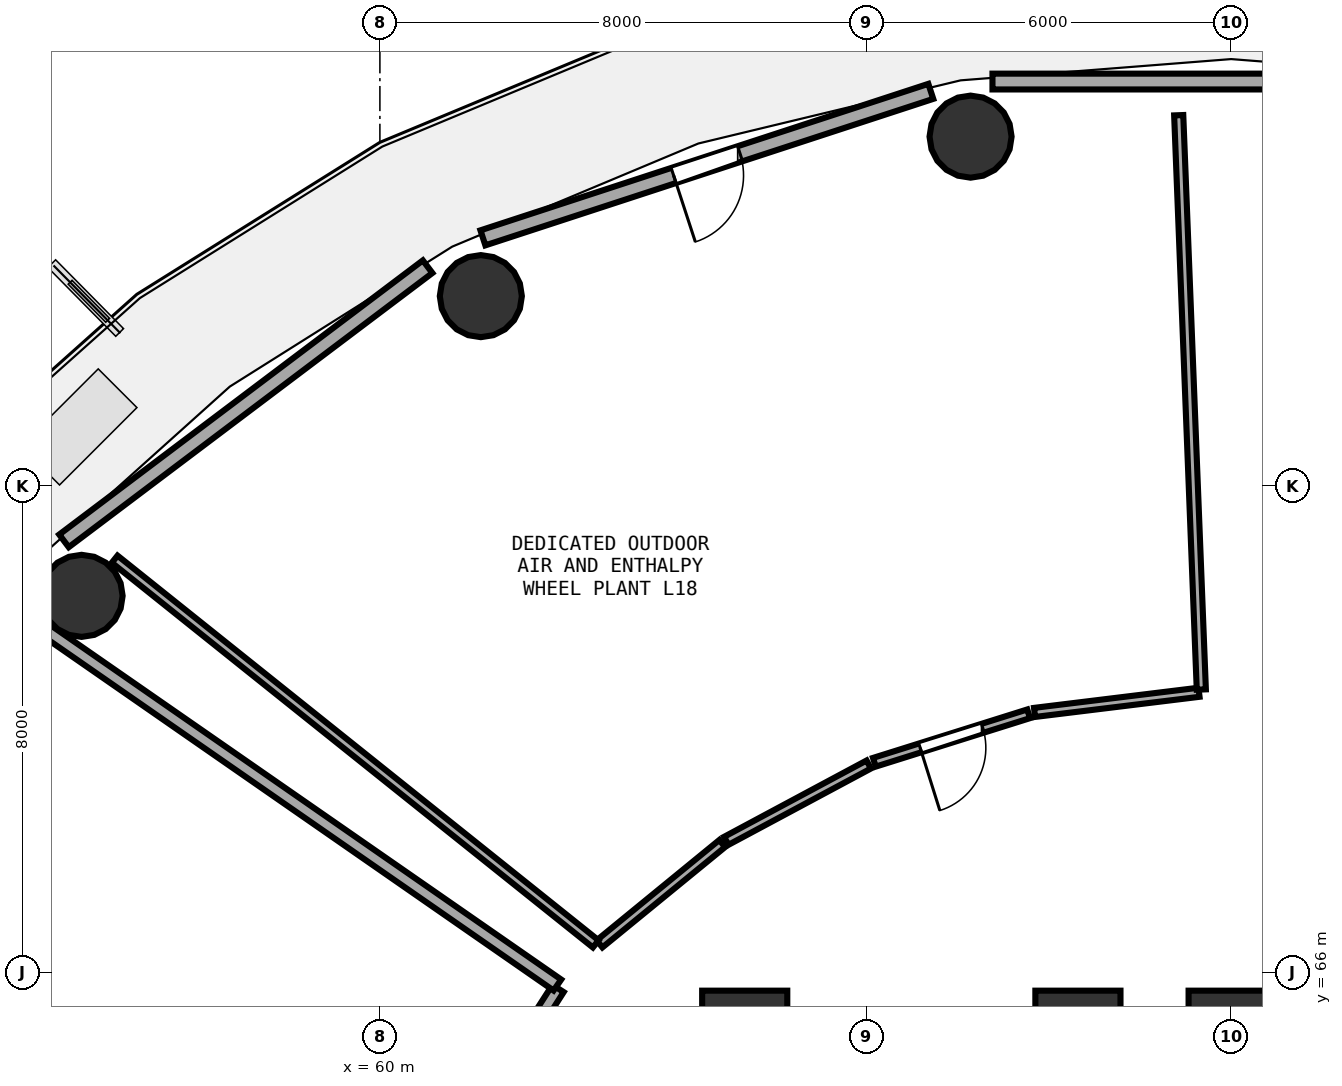
"""IFC4 building model, lengths in metres.
Left out: names, types, materials, properties, quantities, classifications, styles, units other than length and angle.
Written with IfcOpenShell. Run it as: python <this file> out.ifc"""

import sys

from ifc_helpers import new_model, si_unit, direction, frame, frame_2d, origin, origin_2d, place, context, subcontext, project, spatial, rectangle, circle, extrude, element, fill, save


model = new_model("IFC4")
c1 = context("Model", 3, precision=1e-05, world=origin(), true_north=direction((0.0, 1.0)))
c2 = subcontext(c1, "Body", "Model", "MODEL_VIEW")
j1 = project(units=[si_unit("LENGTHUNIT", "METRE"), si_unit("PLANEANGLEUNIT", "RADIAN")], contexts=[c1])
p1 = place(None, origin())
s1 = spatial("IfcSite", under=j1, at=p1, CompositionType="ELEMENT")
p2 = place(p1, origin())
s2 = spatial("IfcBuilding", under=s1, at=p2, CompositionType="ELEMENT")
p3 = place(p2, frame((0.0, 0.0, 72.26)))
s3 = spatial("IfcBuildingStorey", under=s2, at=p3, CompositionType="ELEMENT", Elevation=72.26)
for number, where, z_axis, x_axis in (
    (1, (74.0, 65.0, 0.0), (0.0, 0.0, 1.0), (1.0, 0.0, 0.0)),
    (2, (71.48, 65.0, 0.0), (0.0, 0.0, 1.0), (1.0, 0.0, 0.0)),
    (3, (66.0, 65.0, 0.0), (0.0, 0.0, 1.0), (1.0, 0.0, 0.0)),
):
    element("IfcColumn", number, at=place(p3, frame(where, z_axis=z_axis, x_axis=x_axis)), inside=s3, PredefinedType="PILASTER", context=c2, shape_type="SweptSolid", body=[
        extrude(rectangle(XDim=1.4, YDim=1.4, at=origin_2d()), origin(), (0.0, 0.0, 1.0), 4.09),
    ])
for number, where, z_axis, x_axis in (
    (4, (69.714, 79.745, 0.0), (0.0, 0.0, 1.0), (1.0, 0.0, 0.0)),
    (5, (61.66, 77.122, 0.0), (0.0, 0.0, 1.0), (1.0, 0.0, 0.0)),
    (6, (55.094, 72.193, 0.0), (0.0, 0.0, 1.0), (1.0, 0.0, 0.0)),
):
    element("IfcColumn", number, at=place(p3, frame(where, z_axis=z_axis, x_axis=x_axis)), inside=s3, PredefinedType="COLUMN", context=c2, shape_type="SweptSolid", body=[
        extrude(circle(Radius=0.675, at=origin_2d()), origin(), (0.0, 0.0, 1.0), 4.09),
    ])
p4 = place(p3, frame((77.925, 80.651, 0.0), z_axis=(0.0, 0.0, 1.0), x_axis=(-1.0, 0.0, 0.0)))
e7 = element("IfcWall", 7, at=p4, inside=s3, PredefinedType="SOLIDWALL", context=c2, shape_type="SweptSolid", body=[
    extrude(rectangle(XDim=7.851, YDim=0.26, at=frame_2d((3.925, 0.0))), origin(), (0.0, 0.0, 1.0), 3.815),
])
p5 = place(p3, frame((69.06, 80.489, 0.0), z_axis=(0.0, 0.0, 1.0), x_axis=(-0.950466692879, -0.310826423792, 0.0)))
e8 = element("IfcWall", 8, at=p5, inside=s3, PredefinedType="SOLIDWALL", context=c2, shape_type="SweptSolid", body=[
    extrude(rectangle(XDim=7.75, YDim=0.26, at=frame_2d((3.875, 0.0))), origin(), (0.0, 0.0, 1.0), 3.815),
])
p6 = place(p5, frame((3.3, 0.0, 0.0)))
e9 = element("IfcOpeningElement", 9, at=p6, cuts=e8, PredefinedType="OPENING", context=c2, shape_type="SweptSolid", body=[
    extrude(rectangle(XDim=1.15, YDim=2.15, at=frame_2d((0.575, 1.075))), frame((0.0, 0.14, 0.0), z_axis=(0.0, -1.0, 0.0), x_axis=(1.0, 0.0, 0.0)), (0.0, 0.0, 1.0), 0.28),
])
p7 = place(p3, frame((60.785, 77.606, 0.0), z_axis=(0.0, 0.0, 1.0), x_axis=(-0.798511093866, -0.601980093502, 0.0)))
e10 = element("IfcWall", 10, at=p7, inside=s3, PredefinedType="SOLIDWALL", context=c2, shape_type="SweptSolid", body=[
    extrude(rectangle(XDim=7.49, YDim=0.26, at=frame_2d((3.745, 0.0))), origin(), (0.0, 0.0, 1.0), 3.815),
])
p8 = place(p3, frame((70.67, 70.253, 0.0), z_axis=(0.0, 0.0, 1.0), x_axis=(-0.954072441826, -0.299575993278, 0.0)))
e11 = element("IfcWall", 11, at=p8, inside=s3, PredefinedType="PARTITIONING", context=c2, shape_type="SweptSolid", body=[
    extrude(rectangle(XDim=2.66, YDim=0.15, at=frame_2d((1.33, 0.0))), origin(), (0.0, 0.0, 1.0), 3.265),
])
p9 = place(p8, frame((0.79, 0.0, 0.0)))
e12 = element("IfcOpeningElement", 12, at=p9, cuts=e11, PredefinedType="OPENING", context=c2, shape_type="SweptSolid", body=[
    extrude(rectangle(XDim=1.08, YDim=2.1, at=frame_2d((0.54, 1.05))), frame((0.0, 0.085, 0.0), z_axis=(0.0, -1.0, 0.0), x_axis=(1.0, 0.0, 0.0)), (0.0, 0.0, 1.0), 0.17),
])
p10 = place(p3, frame((73.471, 70.607, 0.0), z_axis=(0.0, 0.0, 1.0), x_axis=(-0.99258087274, -0.12158622895, 0.0)))
e13 = element("IfcWall", 13, at=p10, inside=s3, PredefinedType="PARTITIONING", context=c2, shape_type="SweptSolid", body=[
    extrude(rectangle(XDim=2.725, YDim=0.15, at=frame_2d((1.362, 0.0))), origin(), (0.0, 0.0, 1.0), 3.265),
])
p11 = place(p3, frame((68.04, 69.419, 0.0), z_axis=(0.0, 0.0, 1.0), x_axis=(-0.881492256426, -0.47219847719, 0.0)))
e14 = element("IfcWall", 14, at=p11, inside=s3, PredefinedType="PARTITIONING", context=c2, shape_type="SweptSolid", body=[
    extrude(rectangle(XDim=2.658, YDim=0.15, at=frame_2d((1.329, 0.0))), origin(), (0.0, 0.0, 1.0), 3.82),
])
p12 = place(p3, frame((65.63, 68.12, 0.0), z_axis=(0.0, 0.0, 1.0), x_axis=(-0.774061607798, -0.633110280546, 0.0)))
e15 = element("IfcWall", 15, at=p12, inside=s3, PredefinedType="PARTITIONING", context=c2, shape_type="SweptSolid", body=[
    extrude(rectangle(XDim=2.607, YDim=0.15, at=frame_2d((1.303, 0.0))), origin(), (0.0, 0.0, 1.0), 3.265),
])
p13 = place(p3, frame((63.55, 66.469, 0.0), z_axis=(0.0, 0.0, 1.0), x_axis=(-0.780984005832, 0.624551024845, 0.0)))
e16 = element("IfcWall", 16, at=p13, inside=s3, PredefinedType="PARTITIONING", context=c2, shape_type="SweptSolid", body=[
    extrude(rectangle(XDim=10.13, YDim=0.15, at=frame_2d((5.065, 0.0))), origin(), (0.0, 0.0, 1.0), 3.265),
])
p14 = place(p3, frame((73.138, 80.097, 0.0), z_axis=(0.0, 0.0, 1.0), x_axis=(0.039337774714, -0.999225970179, 0.0)))
e17 = element("IfcWall", 17, at=p14, inside=s3, PredefinedType="PARTITIONING", context=c2, shape_type="SweptSolid", body=[
    extrude(rectangle(XDim=9.452, YDim=0.15, at=frame_2d((4.726, 0.0))), origin(), (0.0, 0.0, 1.0), 3.315),
])
p15 = place(p3, frame((62.93, 65.736, 0.0), z_axis=(0.0, 0.0, 1.0), x_axis=(-0.539849412271, -0.841761612376, 0.0)))
e18 = element("IfcWall", 18, at=p15, inside=s3, PredefinedType="SOLIDWALL", context=c2, shape_type="SweptSolid", body=[
    extrude(rectangle(XDim=3.534, YDim=0.22, at=frame_2d((1.767, 0.0))), origin(), (0.0, 0.0, 1.0), 3.265),
])
p16 = place(p3, frame((54.53, 71.614, 0.0), z_axis=(0.0, 0.0, 1.0), x_axis=(0.821573715698, -0.570102297553, 0.0)))
e19 = element("IfcWall", 19, at=p16, inside=s3, PredefinedType="SOLIDWALL", context=c2, shape_type="SweptSolid", body=[
    extrude(rectangle(XDim=10.211, YDim=0.22, at=frame_2d((5.106, 0.0))), origin(), (0.0, 0.0, 1.0), 3.315),
])
p17 = place(p6, frame((1.15, 0.0, 0.0), z_axis=(0.0, 0.0, 1.0), x_axis=(-1.0, 0.0, 0.0)))
e20 = element("IfcDoor", 20, at=p17, inside=s3, OperationType="SINGLE_SWING_LEFT", PredefinedType="DOOR", context=c2, shape_type="SweptSolid", body=[
    extrude(rectangle(XDim=1.15, YDim=2.15, at=frame_2d((0.575, 1.075))), frame((0.0, 0.025, 0.0), z_axis=(0.0, -1.0, 0.0), x_axis=(1.0, 0.0, 0.0)), (0.0, 0.0, 1.0), 0.05),
])
fill(e9, e20)
p18 = place(p9, origin())
e21 = element("IfcDoor", 21, at=p18, inside=s3, OperationType="SINGLE_SWING_RIGHT", PredefinedType="DOOR", context=c2, shape_type="SweptSolid", body=[
    extrude(rectangle(XDim=1.08, YDim=2.1, at=frame_2d((0.54, 1.05))), frame((0.0, 0.025, 0.0), z_axis=(0.0, -1.0, 0.0), x_axis=(1.0, 0.0, 0.0)), (0.0, 0.0, 1.0), 0.05),
])
fill(e12, e21)
save(model, sys.argv[1])
